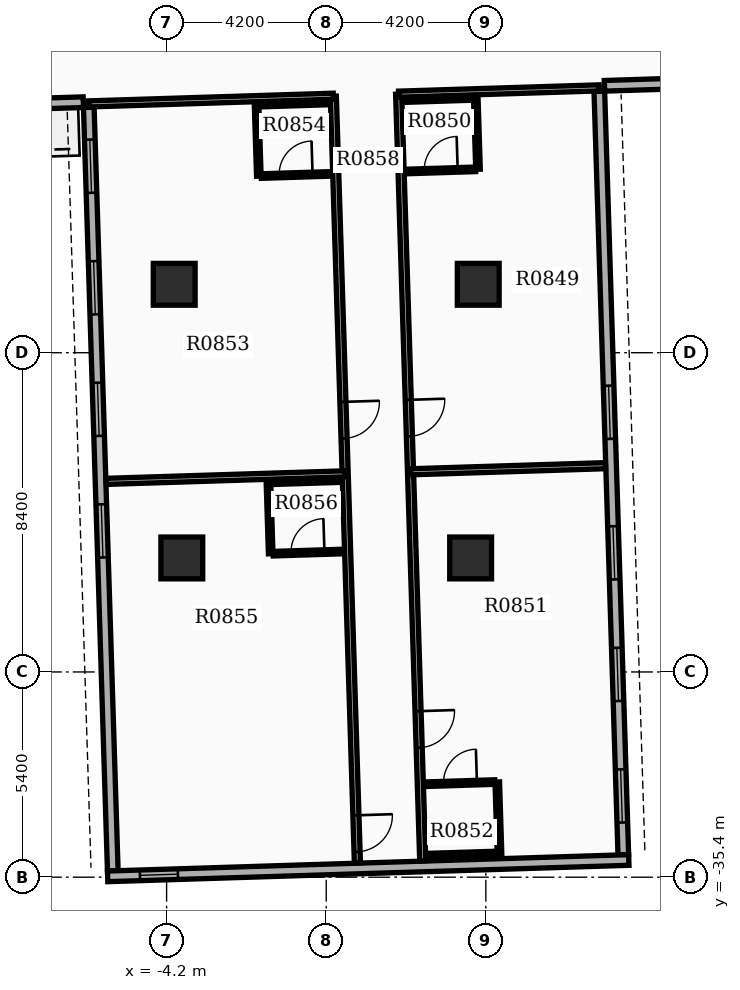
"""IFC4 building model, lengths in metres.
Left out: names, types, materials, properties, quantities, classifications, styles, units other than length and angle.
Written with IfcOpenShell. Run it as: python <this file> out.ifc"""

import sys

from ifc_helpers import new_model, si_unit, direction, frame, frame_2d, origin, origin_2d, place, context, subcontext, project, spatial, rectangle, extrude, element, fill, save


model = new_model("IFC4")
c1 = context("Model", 3, precision=1e-05, world=origin(), true_north=direction((0.0, 1.0)))
c2 = subcontext(c1, "Body", "Model", "MODEL_VIEW")
j1 = project(units=[si_unit("LENGTHUNIT", "METRE"), si_unit("PLANEANGLEUNIT", "RADIAN")], contexts=[c1])
p1 = place(None, origin())
s1 = spatial("IfcSite", under=j1, at=p1, CompositionType="ELEMENT")
p2 = place(p1, origin())
s2 = spatial("IfcBuilding", under=s1, at=p2, CompositionType="ELEMENT")
p3 = place(p2, frame((0.0, 0.0, 56.1)))
s3 = spatial("IfcBuildingStorey", under=s2, at=p3, CompositionType="ELEMENT", Elevation=56.1)
for number, where, z_axis, x_axis in (
    (1, (-4.0, -19.8, 0.0), (0.0, 0.0, 1.0), (1.0, 0.0, 0.0)),
    (2, (4.0, -19.8, 0.0), (0.0, 0.0, 1.0), (1.0, 0.0, 0.0)),
    (3, (-3.8, -27.0, 0.0), (0.0, 0.0, 1.0), (1.0, 0.0, 0.0)),
    (4, (3.8, -27.0, 0.0), (0.0, 0.0, 1.0), (1.0, 0.0, 0.0)),
):
    element("IfcColumn", number, at=place(p3, frame(where, z_axis=z_axis, x_axis=x_axis)), inside=s3, PredefinedType="COLUMN", context=c2, shape_type="SweptSolid", body=[
        extrude(rectangle(XDim=1.1, YDim=1.1, at=origin_2d()), origin(), (0.0, 0.0, 1.0), 3.9),
    ])
p4 = place(p3, frame((-6.247, -15.144, 0.0), z_axis=(0.0, 0.0, 1.0), x_axis=(0.031398187845, -0.999506955354, 0.0)))
e5 = element("IfcWall", 5, at=p4, inside=s3, PredefinedType="STANDARD", context=c2, shape_type="SweptSolid", body=[
    extrude(rectangle(XDim=20.1, YDim=0.28, at=frame_2d((10.05, 0.0))), origin(), (0.0, 0.0, 1.0), 2.91),
])
p5 = place(p4, frame((0.85, 0.0, 0.8)))
e6 = element("IfcOpeningElement", 6, at=p5, cuts=e5, PredefinedType="OPENING", context=c2, shape_type="SweptSolid", body=[
    extrude(rectangle(XDim=1.4, YDim=1.6, at=frame_2d((0.7, 0.8))), frame((0.0, 0.15, 0.0), z_axis=(0.0, -1.0, 0.0), x_axis=(1.0, 0.0, 0.0)), (0.0, 0.0, 1.0), 0.3),
])
p6 = place(p4, frame((4.05, 0.0, 0.8)))
e7 = element("IfcOpeningElement", 7, at=p6, cuts=e5, PredefinedType="OPENING", context=c2, shape_type="SweptSolid", body=[
    extrude(rectangle(XDim=1.4, YDim=1.6, at=frame_2d((0.7, 0.8))), frame((0.0, 0.15, 0.0), z_axis=(0.0, -1.0, 0.0), x_axis=(1.0, 0.0, 0.0)), (0.0, 0.0, 1.0), 0.3),
])
p7 = place(p4, frame((7.25, 0.0, 0.8)))
e8 = element("IfcOpeningElement", 8, at=p7, cuts=e5, PredefinedType="OPENING", context=c2, shape_type="SweptSolid", body=[
    extrude(rectangle(XDim=1.4, YDim=1.6, at=frame_2d((0.7, 0.8))), frame((0.0, 0.15, 0.0), z_axis=(0.0, -1.0, 0.0), x_axis=(1.0, 0.0, 0.0)), (0.0, 0.0, 1.0), 0.3),
])
p8 = place(p4, frame((10.45, 0.0, 0.8)))
e9 = element("IfcOpeningElement", 9, at=p8, cuts=e5, PredefinedType="OPENING", context=c2, shape_type="SweptSolid", body=[
    extrude(rectangle(XDim=1.4, YDim=1.6, at=frame_2d((0.7, 0.8))), frame((0.0, 0.15, 0.0), z_axis=(0.0, -1.0, 0.0), x_axis=(1.0, 0.0, 0.0)), (0.0, 0.0, 1.0), 0.3),
])
p9 = place(p3, frame((7.817, -34.812, 0.0), z_axis=(0.0, 0.0, 1.0), x_axis=(-0.031410322165, 0.999506574096, 0.0)))
e10 = element("IfcWall", 10, at=p9, inside=s3, PredefinedType="STANDARD", context=c2, shape_type="SweptSolid", body=[
    extrude(rectangle(XDim=20.1, YDim=0.28, at=frame_2d((10.05, 0.0))), origin(), (0.0, 0.0, 1.0), 2.91),
])
p10 = place(p9, frame((0.85, 0.0, 0.8)))
e11 = element("IfcOpeningElement", 11, at=p10, cuts=e10, PredefinedType="OPENING", context=c2, shape_type="SweptSolid", body=[
    extrude(rectangle(XDim=1.4, YDim=1.6, at=frame_2d((0.7, 0.8))), frame((0.0, 0.15, 0.0), z_axis=(0.0, -1.0, 0.0), x_axis=(1.0, 0.0, 0.0)), (0.0, 0.0, 1.0), 0.3),
])
p11 = place(p9, frame((4.05, 0.0, 0.8)))
e12 = element("IfcOpeningElement", 12, at=p11, cuts=e10, PredefinedType="OPENING", context=c2, shape_type="SweptSolid", body=[
    extrude(rectangle(XDim=1.4, YDim=1.6, at=frame_2d((0.7, 0.8))), frame((0.0, 0.15, 0.0), z_axis=(0.0, -1.0, 0.0), x_axis=(1.0, 0.0, 0.0)), (0.0, 0.0, 1.0), 0.3),
])
p12 = place(p9, frame((7.25, 0.0, 0.8)))
e13 = element("IfcOpeningElement", 13, at=p12, cuts=e10, PredefinedType="OPENING", context=c2, shape_type="SweptSolid", body=[
    extrude(rectangle(XDim=1.4, YDim=1.6, at=frame_2d((0.7, 0.8))), frame((0.0, 0.15, 0.0), z_axis=(0.0, -1.0, 0.0), x_axis=(1.0, 0.0, 0.0)), (0.0, 0.0, 1.0), 0.3),
])
p13 = place(p9, frame((10.95, 0.0, 0.8)))
e14 = element("IfcOpeningElement", 14, at=p13, cuts=e10, PredefinedType="OPENING", context=c2, shape_type="SweptSolid", body=[
    extrude(rectangle(XDim=1.4, YDim=1.6, at=frame_2d((0.7, 0.8))), frame((0.0, 0.15, 0.0), z_axis=(0.0, -1.0, 0.0), x_axis=(1.0, 0.0, 0.0)), (0.0, 0.0, 1.0), 0.3),
])
p14 = place(p3, frame((-5.752, -35.378, 0.0), z_axis=(0.0, 0.0, 1.0), x_axis=(0.999506679556, 0.031406966164, 0.0)))
e15 = element("IfcWall", 15, at=p14, inside=s3, PredefinedType="STANDARD", context=c2, shape_type="SweptSolid", body=[
    extrude(rectangle(XDim=13.72, YDim=0.28, at=frame_2d((6.86, 0.0))), origin(), (0.0, 0.0, 1.0), 2.91),
])
p15 = place(p14, frame((0.85, 0.0, 0.85)))
e16 = element("IfcOpeningElement", 16, at=p15, cuts=e15, PredefinedType="OPENING", context=c2, shape_type="SweptSolid", body=[
    extrude(rectangle(XDim=1.0, YDim=1.5, at=frame_2d((0.5, 0.75))), frame((0.0, 0.15, 0.0), z_axis=(0.0, -1.0, 0.0), x_axis=(1.0, 0.0, 0.0)), (0.0, 0.0, 1.0), 0.3),
])
p16 = place(p3, frame((-12.689, -15.206, 0.0), z_axis=(0.0, 0.0, 1.0), x_axis=(0.999507262922, 0.031388395416, 0.0)))
e17 = element("IfcWall", 17, at=p16, inside=s3, PredefinedType="STANDARD", context=c2, shape_type="SweptSolid", body=[
    extrude(rectangle(XDim=6.3, YDim=0.28, at=frame_2d((3.15, 0.0))), origin(), (0.0, 0.0, 1.0), 2.91),
])
p17 = place(p3, frame((13.618, -14.379, 0.0), z_axis=(0.0, 0.0, 1.0), x_axis=(-0.999507224741, -0.031389611199, 0.0)))
e18 = element("IfcWall", 18, at=p17, inside=s3, PredefinedType="STANDARD", context=c2, shape_type="SweptSolid", body=[
    extrude(rectangle(XDim=6.3, YDim=0.28, at=frame_2d((3.15, 0.0))), origin(), (0.0, 0.0, 1.0), 2.91),
])
p18 = place(p3, frame((1.906, -14.797, 0.0), z_axis=(0.0, 0.0, 1.0), x_axis=(0.031415650687, -0.999506406629, 0.0)))
e19 = element("IfcWall", 19, at=p18, inside=s3, PredefinedType="PARTITIONING", context=c2, shape_type="SweptSolid", body=[
    extrude(rectangle(XDim=20.182, YDim=0.16, at=frame_2d((10.091, 0.0))), origin(), (0.0, 0.0, 1.0), 2.9),
])
p19 = place(p18, frame((8.047, 0.0, 0.0)))
e20 = element("IfcOpeningElement", 20, at=p19, cuts=e19, PredefinedType="OPENING", context=c2, shape_type="SweptSolid", body=[
    extrude(rectangle(XDim=0.96, YDim=2.15, at=frame_2d((0.48, 1.075))), frame((0.0, 0.09, 0.0), z_axis=(0.0, -1.0, 0.0), x_axis=(1.0, 0.0, 0.0)), (0.0, 0.0, 1.0), 0.18),
])
p20 = place(p18, frame((16.243, 0.0, 0.0)))
e21 = element("IfcOpeningElement", 21, at=p20, cuts=e19, PredefinedType="OPENING", context=c2, shape_type="SweptSolid", body=[
    extrude(rectangle(XDim=0.96, YDim=2.15, at=frame_2d((0.48, 1.075))), frame((0.0, 0.09, 0.0), z_axis=(0.0, -1.0, 0.0), x_axis=(1.0, 0.0, 0.0)), (0.0, 0.0, 1.0), 0.18),
])
p21 = place(p3, frame((1.906, -14.797, 0.0), z_axis=(0.0, 0.0, 1.0), x_axis=(0.99950701053, 0.031396431354, 0.0)))
e22 = element("IfcWall", 22, at=p21, inside=s3, PredefinedType="PARTITIONING", context=c2, shape_type="SweptSolid", body=[
    extrude(rectangle(XDim=5.28, YDim=0.16, at=frame_2d((2.64, 0.0))), origin(), (0.0, 0.0, 1.0), 2.9),
])
p22 = place(p3, frame((2.218, -24.733, 0.0), z_axis=(0.0, 0.0, 1.0), x_axis=(0.999506957349, 0.031398124315, 0.0)))
e23 = element("IfcWall", 23, at=p22, inside=s3, PredefinedType="PARTITIONING", context=c2, shape_type="SweptSolid", body=[
    extrude(rectangle(XDim=5.132, YDim=0.16, at=frame_2d((2.566, 0.0))), origin(), (0.0, 0.0, 1.0), 2.9),
])
p23 = place(p3, frame((2.11, -16.832, 0.0), z_axis=(0.0, 0.0, 1.0), x_axis=(0.999507353951, 0.031385496622, 0.0)))
e24 = element("IfcWall", 24, at=p23, inside=s3, PredefinedType="PARTITIONING", context=c2, shape_type="SweptSolid", body=[
    extrude(rectangle(XDim=1.82, YDim=0.12, at=frame_2d((0.91, 0.0))), origin(), (0.0, 0.0, 1.0), 2.9),
])
p24 = place(p23, frame((0.47, 0.0, 0.0)))
e25 = element("IfcOpeningElement", 25, at=p24, cuts=e24, PredefinedType="OPENING", context=c2, shape_type="SweptSolid", body=[
    extrude(rectangle(XDim=0.88, YDim=2.1, at=frame_2d((0.44, 1.05))), frame((0.0, 0.07, 0.0), z_axis=(0.0, -1.0, 0.0), x_axis=(1.0, 0.0, 0.0)), (0.0, 0.0, 1.0), 0.14),
])
p25 = place(p3, frame((2.051, -14.953, 0.0), z_axis=(0.0, 0.0, 1.0), x_axis=(0.999507221803, 0.031389704724, 0.0)))
e26 = element("IfcWall", 26, at=p25, inside=s3, PredefinedType="PARTITIONING", context=c2, shape_type="SweptSolid", body=[
    extrude(rectangle(XDim=1.82, YDim=0.12, at=frame_2d((0.91, 0.0))), origin(), (0.0, 0.0, 1.0), 2.9),
])
p26 = place(p3, frame((3.935, -14.894, 0.0), z_axis=(0.0, 0.0, 1.0), x_axis=(0.031429371883, -0.999505975261, 0.0)))
e27 = element("IfcWall", 27, at=p26, inside=s3, PredefinedType="PARTITIONING", context=c2, shape_type="SweptSolid", body=[
    extrude(rectangle(XDim=1.88, YDim=0.12, at=frame_2d((0.94, 0.0))), origin(), (0.0, 0.0, 1.0), 2.9),
])
p27 = place(p3, frame((2.616, -32.954, 0.0), z_axis=(0.0, 0.0, 1.0), x_axis=(0.999507221803, 0.031389704724, 0.0)))
e28 = element("IfcWall", 28, at=p27, inside=s3, PredefinedType="PARTITIONING", context=c2, shape_type="SweptSolid", body=[
    extrude(rectangle(XDim=1.82, YDim=0.12, at=frame_2d((0.91, 0.0))), origin(), (0.0, 0.0, 1.0), 2.9),
])
p28 = place(p27, frame((0.47, 0.0, 0.0)))
e29 = element("IfcOpeningElement", 29, at=p28, cuts=e28, PredefinedType="OPENING", context=c2, shape_type="SweptSolid", body=[
    extrude(rectangle(XDim=0.88, YDim=2.1, at=frame_2d((0.44, 1.05))), frame((0.0, 0.07, 0.0), z_axis=(0.0, -1.0, 0.0), x_axis=(1.0, 0.0, 0.0)), (0.0, 0.0, 1.0), 0.14),
])
p29 = place(p3, frame((2.676, -34.833, 0.0), z_axis=(0.0, 0.0, 1.0), x_axis=(0.999507221803, 0.031389704724, 0.0)))
e30 = element("IfcWall", 30, at=p29, inside=s3, PredefinedType="PARTITIONING", context=c2, shape_type="SweptSolid", body=[
    extrude(rectangle(XDim=1.82, YDim=0.12, at=frame_2d((0.91, 0.0))), origin(), (0.0, 0.0, 1.0), 2.9),
])
p30 = place(p3, frame((4.5, -32.895, 0.0), z_axis=(0.0, 0.0, 1.0), x_axis=(0.031429371883, -0.999505975261, 0.0)))
e31 = element("IfcWall", 31, at=p30, inside=s3, PredefinedType="PARTITIONING", context=c2, shape_type="SweptSolid", body=[
    extrude(rectangle(XDim=1.88, YDim=0.12, at=frame_2d((0.94, 0.0))), origin(), (0.0, 0.0, 1.0), 2.9),
])
p31 = place(p3, frame((0.187, -14.852, 0.0), z_axis=(0.0, 0.0, 1.0), x_axis=(0.031416030536, -0.99950639469, 0.0)))
e32 = element("IfcWall", 32, at=p31, inside=s3, PredefinedType="PARTITIONING", context=c2, shape_type="SweptSolid", body=[
    extrude(rectangle(XDim=20.182, YDim=0.16, at=frame_2d((10.091, 0.0))), origin(), (0.0, 0.0, 1.0), 2.9),
])
p32 = place(p31, frame((8.047, 0.0, 0.0)))
e33 = element("IfcOpeningElement", 33, at=p32, cuts=e32, PredefinedType="OPENING", context=c2, shape_type="SweptSolid", body=[
    extrude(rectangle(XDim=0.96, YDim=2.15, at=frame_2d((0.48, 1.075))), frame((0.0, 0.09, 0.0), z_axis=(0.0, -1.0, 0.0), x_axis=(1.0, 0.0, 0.0)), (0.0, 0.0, 1.0), 0.18),
])
p33 = place(p31, frame((18.93, 0.0, 0.0)))
e34 = element("IfcOpeningElement", 34, at=p33, cuts=e32, PredefinedType="OPENING", context=c2, shape_type="SweptSolid", body=[
    extrude(rectangle(XDim=0.96, YDim=2.15, at=frame_2d((0.48, 1.075))), frame((0.0, 0.09, 0.0), z_axis=(0.0, -1.0, 0.0), x_axis=(1.0, 0.0, 0.0)), (0.0, 0.0, 1.0), 0.18),
])
p34 = place(p3, frame((0.187, -14.852, 0.0), z_axis=(0.0, 0.0, 1.0), x_axis=(-0.99950721893, -0.031389796217, 0.0)))
e35 = element("IfcWall", 35, at=p34, inside=s3, PredefinedType="PARTITIONING", context=c2, shape_type="SweptSolid", body=[
    extrude(rectangle(XDim=6.44, YDim=0.16, at=frame_2d((3.22, 0.0))), origin(), (0.0, 0.0, 1.0), 2.9),
])
p35 = place(p3, frame((0.499, -24.788, 0.0), z_axis=(0.0, 0.0, 1.0), x_axis=(-0.999507180466, -0.031391020963, 0.0)))
e36 = element("IfcWall", 36, at=p35, inside=s3, PredefinedType="PARTITIONING", context=c2, shape_type="SweptSolid", body=[
    extrude(rectangle(XDim=6.292, YDim=0.16, at=frame_2d((3.146, 0.0))), origin(), (0.0, 0.0, 1.0), 2.9),
])
p36 = place(p3, frame((-1.708, -16.952, 0.0), z_axis=(0.0, 0.0, 1.0), x_axis=(0.999511421504, 0.031255692016, 0.0)))
e37 = element("IfcWall", 37, at=p36, inside=s3, PredefinedType="PARTITIONING", context=c2, shape_type="SweptSolid", body=[
    extrude(rectangle(XDim=1.82, YDim=0.12, at=frame_2d((0.91, 0.0))), origin(), (0.0, 0.0, 1.0), 2.9),
])
p37 = place(p36, frame((0.47, 0.0, 0.0)))
e38 = element("IfcOpeningElement", 38, at=p37, cuts=e37, PredefinedType="OPENING", context=c2, shape_type="SweptSolid", body=[
    extrude(rectangle(XDim=0.88, YDim=2.1, at=frame_2d((0.44, 1.05))), frame((0.0, 0.07, 0.0), z_axis=(0.0, -1.0, 0.0), x_axis=(1.0, 0.0, 0.0)), (0.0, 0.0, 1.0), 0.14),
])
p38 = place(p3, frame((-1.767, -15.073, 0.0), z_axis=(0.0, 0.0, 1.0), x_axis=(0.999507221803, 0.031389704724, 0.0)))
e39 = element("IfcWall", 39, at=p38, inside=s3, PredefinedType="PARTITIONING", context=c2, shape_type="SweptSolid", body=[
    extrude(rectangle(XDim=1.82, YDim=0.12, at=frame_2d((0.91, 0.0))), origin(), (0.0, 0.0, 1.0), 2.9),
])
p39 = place(p3, frame((-1.833, -15.075, 0.0), z_axis=(0.0, 0.0, 1.0), x_axis=(0.031555020134, -0.999502016358, 0.0)))
e40 = element("IfcWall", 40, at=p39, inside=s3, PredefinedType="PARTITIONING", context=c2, shape_type="SweptSolid", body=[
    extrude(rectangle(XDim=1.88, YDim=0.12, at=frame_2d((0.94, 0.0))), origin(), (0.0, 0.0, 1.0), 2.9),
])
p40 = place(p3, frame((-1.396, -26.888, 0.0), z_axis=(0.0, 0.0, 1.0), x_axis=(0.999507221803, 0.031389704724, 0.0)))
e41 = element("IfcWall", 41, at=p40, inside=s3, PredefinedType="PARTITIONING", context=c2, shape_type="SweptSolid", body=[
    extrude(rectangle(XDim=1.82, YDim=0.12, at=frame_2d((0.91, 0.0))), origin(), (0.0, 0.0, 1.0), 2.9),
])
p41 = place(p40, frame((0.47, 0.0, 0.0)))
e42 = element("IfcOpeningElement", 42, at=p41, cuts=e41, PredefinedType="OPENING", context=c2, shape_type="SweptSolid", body=[
    extrude(rectangle(XDim=0.88, YDim=2.1, at=frame_2d((0.44, 1.05))), frame((0.0, 0.07, 0.0), z_axis=(0.0, -1.0, 0.0), x_axis=(1.0, 0.0, 0.0)), (0.0, 0.0, 1.0), 0.14),
])
p42 = place(p3, frame((-1.455, -25.009, 0.0), z_axis=(0.0, 0.0, 1.0), x_axis=(0.999507221803, 0.031389704724, 0.0)))
e43 = element("IfcWall", 43, at=p42, inside=s3, PredefinedType="PARTITIONING", context=c2, shape_type="SweptSolid", body=[
    extrude(rectangle(XDim=1.82, YDim=0.12, at=frame_2d((0.91, 0.0))), origin(), (0.0, 0.0, 1.0), 2.9),
])
p43 = place(p3, frame((-1.52, -25.011, 0.0), z_axis=(0.0, 0.0, 1.0), x_axis=(0.031295563454, -0.999510173889, 0.0)))
e44 = element("IfcWall", 44, at=p43, inside=s3, PredefinedType="PARTITIONING", context=c2, shape_type="SweptSolid", body=[
    extrude(rectangle(XDim=1.88, YDim=0.12, at=frame_2d((0.94, 0.0))), origin(), (0.0, 0.0, 1.0), 2.9),
])
p44 = place(p5, origin())
e45 = element("IfcWindow", 45, at=p44, inside=s3, PartitioningType="SINGLE_PANEL", PredefinedType="WINDOW", context=c2, shape_type="SweptSolid", body=[
    extrude(rectangle(XDim=1.4, YDim=1.6, at=frame_2d((0.7, 0.8))), frame((0.0, 0.03, 0.0), z_axis=(0.0, -1.0, 0.0), x_axis=(1.0, 0.0, 0.0)), (0.0, 0.0, 1.0), 0.06),
])
fill(e6, e45)
p45 = place(p6, origin())
e46 = element("IfcWindow", 46, at=p45, inside=s3, PartitioningType="SINGLE_PANEL", PredefinedType="WINDOW", context=c2, shape_type="SweptSolid", body=[
    extrude(rectangle(XDim=1.4, YDim=1.6, at=frame_2d((0.7, 0.8))), frame((0.0, 0.03, 0.0), z_axis=(0.0, -1.0, 0.0), x_axis=(1.0, 0.0, 0.0)), (0.0, 0.0, 1.0), 0.06),
])
fill(e7, e46)
p46 = place(p7, origin())
e47 = element("IfcWindow", 47, at=p46, inside=s3, PartitioningType="SINGLE_PANEL", PredefinedType="WINDOW", context=c2, shape_type="SweptSolid", body=[
    extrude(rectangle(XDim=1.4, YDim=1.6, at=frame_2d((0.7, 0.8))), frame((0.0, 0.03, 0.0), z_axis=(0.0, -1.0, 0.0), x_axis=(1.0, 0.0, 0.0)), (0.0, 0.0, 1.0), 0.06),
])
fill(e8, e47)
p47 = place(p8, origin())
e48 = element("IfcWindow", 48, at=p47, inside=s3, PartitioningType="SINGLE_PANEL", PredefinedType="WINDOW", context=c2, shape_type="SweptSolid", body=[
    extrude(rectangle(XDim=1.4, YDim=1.6, at=frame_2d((0.7, 0.8))), frame((0.0, 0.03, 0.0), z_axis=(0.0, -1.0, 0.0), x_axis=(1.0, 0.0, 0.0)), (0.0, 0.0, 1.0), 0.06),
])
fill(e9, e48)
p48 = place(p10, origin())
e49 = element("IfcWindow", 49, at=p48, inside=s3, PartitioningType="SINGLE_PANEL", PredefinedType="WINDOW", context=c2, shape_type="SweptSolid", body=[
    extrude(rectangle(XDim=1.4, YDim=1.6, at=frame_2d((0.7, 0.8))), frame((0.0, 0.03, 0.0), z_axis=(0.0, -1.0, 0.0), x_axis=(1.0, 0.0, 0.0)), (0.0, 0.0, 1.0), 0.06),
])
fill(e11, e49)
p49 = place(p11, origin())
e50 = element("IfcWindow", 50, at=p49, inside=s3, PartitioningType="SINGLE_PANEL", PredefinedType="WINDOW", context=c2, shape_type="SweptSolid", body=[
    extrude(rectangle(XDim=1.4, YDim=1.6, at=frame_2d((0.7, 0.8))), frame((0.0, 0.03, 0.0), z_axis=(0.0, -1.0, 0.0), x_axis=(1.0, 0.0, 0.0)), (0.0, 0.0, 1.0), 0.06),
])
fill(e12, e50)
p50 = place(p12, origin())
e51 = element("IfcWindow", 51, at=p50, inside=s3, PartitioningType="SINGLE_PANEL", PredefinedType="WINDOW", context=c2, shape_type="SweptSolid", body=[
    extrude(rectangle(XDim=1.4, YDim=1.6, at=frame_2d((0.7, 0.8))), frame((0.0, 0.03, 0.0), z_axis=(0.0, -1.0, 0.0), x_axis=(1.0, 0.0, 0.0)), (0.0, 0.0, 1.0), 0.06),
])
fill(e13, e51)
p51 = place(p13, origin())
e52 = element("IfcWindow", 52, at=p51, inside=s3, PartitioningType="SINGLE_PANEL", PredefinedType="WINDOW", context=c2, shape_type="SweptSolid", body=[
    extrude(rectangle(XDim=1.4, YDim=1.6, at=frame_2d((0.7, 0.8))), frame((0.0, 0.03, 0.0), z_axis=(0.0, -1.0, 0.0), x_axis=(1.0, 0.0, 0.0)), (0.0, 0.0, 1.0), 0.06),
])
fill(e14, e52)
p52 = place(p15, origin())
e53 = element("IfcWindow", 53, at=p52, inside=s3, PartitioningType="SINGLE_PANEL", PredefinedType="WINDOW", context=c2, shape_type="SweptSolid", body=[
    extrude(rectangle(XDim=1.0, YDim=1.5, at=frame_2d((0.5, 0.75))), frame((0.0, 0.03, 0.0), z_axis=(0.0, -1.0, 0.0), x_axis=(1.0, 0.0, 0.0)), (0.0, 0.0, 1.0), 0.06),
])
fill(e16, e53)
p53 = place(p19, origin())
e54 = element("IfcDoor", 54, at=p53, inside=s3, OperationType="SINGLE_SWING_LEFT", PredefinedType="DOOR", context=c2, shape_type="SweptSolid", body=[
    extrude(rectangle(XDim=0.96, YDim=2.15, at=frame_2d((0.48, 1.075))), frame((0.0, 0.025, 0.0), z_axis=(0.0, -1.0, 0.0), x_axis=(1.0, 0.0, 0.0)), (0.0, 0.0, 1.0), 0.05),
])
fill(e20, e54)
p54 = place(p24, origin())
e55 = element("IfcDoor", 55, at=p54, inside=s3, OperationType="SINGLE_SWING_RIGHT", PredefinedType="DOOR", context=c2, shape_type="SweptSolid", body=[
    extrude(rectangle(XDim=0.88, YDim=2.1, at=frame_2d((0.44, 1.05))), frame((0.0, 0.025, 0.0), z_axis=(0.0, -1.0, 0.0), x_axis=(1.0, 0.0, 0.0)), (0.0, 0.0, 1.0), 0.05),
])
fill(e25, e55)
p55 = place(p20, origin())
e56 = element("IfcDoor", 56, at=p55, inside=s3, OperationType="SINGLE_SWING_LEFT", PredefinedType="DOOR", context=c2, shape_type="SweptSolid", body=[
    extrude(rectangle(XDim=0.96, YDim=2.15, at=frame_2d((0.48, 1.075))), frame((0.0, 0.025, 0.0), z_axis=(0.0, -1.0, 0.0), x_axis=(1.0, 0.0, 0.0)), (0.0, 0.0, 1.0), 0.05),
])
fill(e21, e56)
p56 = place(p28, origin())
e57 = element("IfcDoor", 57, at=p56, inside=s3, OperationType="SINGLE_SWING_RIGHT", PredefinedType="DOOR", context=c2, shape_type="SweptSolid", body=[
    extrude(rectangle(XDim=0.88, YDim=2.1, at=frame_2d((0.44, 1.05))), frame((0.0, 0.025, 0.0), z_axis=(0.0, -1.0, 0.0), x_axis=(1.0, 0.0, 0.0)), (0.0, 0.0, 1.0), 0.05),
])
fill(e29, e57)
p57 = place(p32, origin())
e58 = element("IfcDoor", 58, at=p57, inside=s3, OperationType="SINGLE_SWING_LEFT", PredefinedType="DOOR", context=c2, shape_type="SweptSolid", body=[
    extrude(rectangle(XDim=0.96, YDim=2.15, at=frame_2d((0.48, 1.075))), frame((0.0, 0.025, 0.0), z_axis=(0.0, -1.0, 0.0), x_axis=(1.0, 0.0, 0.0)), (0.0, 0.0, 1.0), 0.05),
])
fill(e33, e58)
p58 = place(p37, origin())
e59 = element("IfcDoor", 59, at=p58, inside=s3, OperationType="SINGLE_SWING_RIGHT", PredefinedType="DOOR", context=c2, shape_type="SweptSolid", body=[
    extrude(rectangle(XDim=0.88, YDim=2.1, at=frame_2d((0.44, 1.05))), frame((0.0, 0.025, 0.0), z_axis=(0.0, -1.0, 0.0), x_axis=(1.0, 0.0, 0.0)), (0.0, 0.0, 1.0), 0.05),
])
fill(e38, e59)
p59 = place(p33, origin())
e60 = element("IfcDoor", 60, at=p59, inside=s3, OperationType="SINGLE_SWING_LEFT", PredefinedType="DOOR", context=c2, shape_type="SweptSolid", body=[
    extrude(rectangle(XDim=0.96, YDim=2.15, at=frame_2d((0.48, 1.075))), frame((0.0, 0.025, 0.0), z_axis=(0.0, -1.0, 0.0), x_axis=(1.0, 0.0, 0.0)), (0.0, 0.0, 1.0), 0.05),
])
fill(e34, e60)
p60 = place(p41, origin())
e61 = element("IfcDoor", 61, at=p60, inside=s3, OperationType="SINGLE_SWING_RIGHT", PredefinedType="DOOR", context=c2, shape_type="SweptSolid", body=[
    extrude(rectangle(XDim=0.88, YDim=2.1, at=frame_2d((0.44, 1.05))), frame((0.0, 0.025, 0.0), z_axis=(0.0, -1.0, 0.0), x_axis=(1.0, 0.0, 0.0)), (0.0, 0.0, 1.0), 0.05),
])
fill(e42, e61)
save(model, sys.argv[1])
